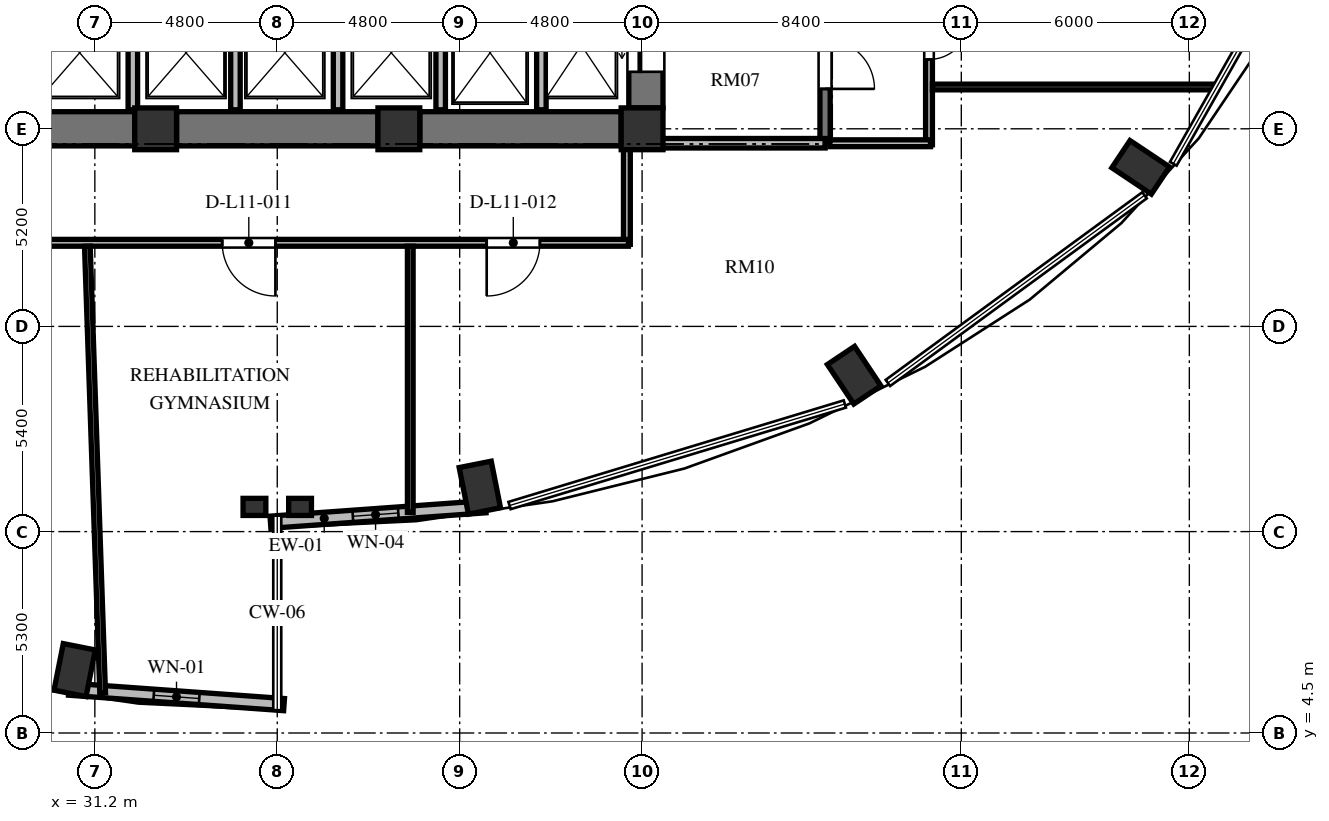
"""IFC4 building model, lengths in metres.
Left out: names, types, materials, properties, quantities, classifications, styles, units other than length and angle.
Written with IfcOpenShell. Run it as: python <this file> out.ifc"""

import sys

from ifc_helpers import new_model, si_unit, direction, frame, frame_2d, origin, origin_2d, place, context, subcontext, project, spatial, rectangle, extrude, element, fill, save


model = new_model("IFC4")
c1 = context("Model", 3, precision=1e-05, world=origin(), true_north=direction((0.0, 1.0)))
c2 = subcontext(c1, "Body", "Model", "MODEL_VIEW")
j1 = project(units=[si_unit("LENGTHUNIT", "METRE"), si_unit("PLANEANGLEUNIT", "RADIAN")], contexts=[c1])
p1 = place(None, origin())
s1 = spatial("IfcSite", under=j1, at=p1, CompositionType="ELEMENT")
p2 = place(p1, origin())
s2 = spatial("IfcBuilding", under=s1, at=p2, CompositionType="ELEMENT")
p3 = place(p2, frame((0.0, 0.0, 47.088)))
s3 = spatial("IfcBuildingStorey", under=s2, at=p3, CompositionType="ELEMENT", Elevation=47.088)
for number, where, z_axis, x_axis in (
    (1, (41.331, 10.956, 0.0), (0.0, 0.0, 1.0), (0.195, -0.981, 0.0)),
    (2, (51.181, 13.916, 0.0), (0.0, 0.0, 1.0), (0.556, -0.831, 0.0)),
    (3, (58.72, 19.386, 0.0), (0.0, 0.0, 1.0), (0.831, -0.556, 0.0)),
    (4, (30.669, 6.156, 0.0), (0.0, 0.0, 1.0), (-0.195, -0.981, 0.0)),
):
    element("IfcColumn", number, at=place(p3, frame(where, z_axis=z_axis, x_axis=x_axis)), inside=s3, PredefinedType="COLUMN", context=c2, shape_type="SweptSolid", body=[
        extrude(rectangle(XDim=1.25, YDim=0.86, at=origin_2d()), origin(), (0.0, 0.0, 1.0), 3.648),
    ])
for number, where, z_axis, x_axis in (
    (5, (32.8, 20.4, 0.0), (0.0, 0.0, 1.0), (1.0, 0.0, 0.0)),
    (6, (39.2, 20.4, 0.0), (0.0, 0.0, 1.0), (1.0, 0.0, 0.0)),
    (7, (45.6, 20.4, 0.0), (0.0, 0.0, 1.0), (1.0, 0.0, 0.0)),
):
    element("IfcColumn", number, at=place(p3, frame(where, z_axis=z_axis, x_axis=x_axis)), inside=s3, PredefinedType="COLUMN", context=c2, shape_type="SweptSolid", body=[
        extrude(rectangle(XDim=1.1, YDim=1.1, at=origin_2d()), origin(), (0.0, 0.0, 1.0), 3.648),
    ])
for number, where, z_axis, x_axis in (
    (8, (35.4, 10.45, 0.0), (0.0, 0.0, 1.0), (1.0, 0.0, 0.0)),
    (9, (36.6, 10.45, 0.0), (0.0, 0.0, 1.0), (1.0, 0.0, 0.0)),
):
    element("IfcColumn", number, at=place(p3, frame(where, z_axis=z_axis, x_axis=x_axis)), inside=s3, PredefinedType="PILASTER", context=c2, shape_type="SweptSolid", body=[
        extrude(rectangle(XDim=0.6, YDim=0.45, at=origin_2d()), origin(), (0.0, 0.0, 1.0), 3.648),
    ])
p4 = place(p3, frame((45.7, 20.95, 0.0), z_axis=(0.0, 0.0, 1.0), x_axis=(0.0, 1.0, 0.0)))
e10 = element("IfcWall", 10, at=p4, inside=s3, PredefinedType="SHEAR", context=c2, shape_type="SweptSolid", body=[
    extrude(rectangle(XDim=14.1, YDim=0.9, at=frame_2d((7.05, 0.0))), origin(), (0.0, 0.0, 1.0), 3.648),
])
p5 = place(p4, frame((11.75, 0.0, 0.0)))
e11 = element("IfcOpeningElement", 11, at=p5, cuts=e10, PredefinedType="OPENING", context=c2, shape_type="SweptSolid", body=[
    extrude(rectangle(XDim=1.4, YDim=2.3, at=frame_2d((0.7, 1.15))), frame((0.0, 0.46, 0.0), z_axis=(0.0, -1.0, 0.0), x_axis=(1.0, 0.0, 0.0)), (0.0, 0.0, 1.0), 0.92),
])
p6 = place(p4, frame((0.95, 0.0, 0.0)))
e12 = element("IfcOpeningElement", 12, at=p6, cuts=e10, PredefinedType="OPENING", context=c2, shape_type="SweptSolid", body=[
    extrude(rectangle(XDim=1.4, YDim=2.3, at=frame_2d((0.7, 1.15))), frame((0.0, 0.46, 0.0), z_axis=(0.0, -1.0, 0.0), x_axis=(1.0, 0.0, 0.0)), (0.0, 0.0, 1.0), 0.92),
])
p7 = place(p3, frame((26.95, 20.4, 0.0), z_axis=(0.0, 0.0, 1.0), x_axis=(1.0, 0.0, 0.0)))
e13 = element("IfcWall", 13, at=p7, inside=s3, PredefinedType="SHEAR", context=c2, shape_type="SweptSolid", body=[
    extrude(rectangle(XDim=5.3, YDim=0.9, at=frame_2d((2.65, 0.0))), origin(), (0.0, 0.0, 1.0), 3.648),
])
p8 = place(p3, frame((33.35, 20.4, 0.0), z_axis=(0.0, 0.0, 1.0), x_axis=(1.0, 0.0, 0.0)))
e14 = element("IfcWall", 14, at=p8, inside=s3, PredefinedType="SHEAR", context=c2, shape_type="SweptSolid", body=[
    extrude(rectangle(XDim=5.3, YDim=0.9, at=frame_2d((2.65, 0.0))), origin(), (0.0, 0.0, 1.0), 3.648),
])
p9 = place(p3, frame((39.75, 20.4, 0.0), z_axis=(0.0, 0.0, 1.0), x_axis=(1.0, 0.0, 0.0)))
e15 = element("IfcWall", 15, at=p9, inside=s3, PredefinedType="SHEAR", context=c2, shape_type="SweptSolid", body=[
    extrude(rectangle(XDim=5.3, YDim=0.9, at=frame_2d((2.65, 0.0))), origin(), (0.0, 0.0, 1.0), 3.648),
])
p10 = place(p3, frame((35.821, 10.047, 0.0), z_axis=(0.0, 0.0, 1.0), x_axis=(0.997422321809, 0.071754525696, 0.0)))
e16 = element("IfcWall", 16, at=p10, inside=s3, PredefinedType="SOLIDWALL", context=c2, shape_type="SweptSolid", body=[
    extrude(rectangle(XDim=5.675, YDim=0.32, at=frame_2d((2.838, 0.0))), origin(), (0.0, 0.0, 1.0), 3.428),
])
p11 = place(p10, frame((2.174, 0.0, 0.85)))
e17 = element("IfcOpeningElement", 17, at=p11, cuts=e16, PredefinedType="OPENING", context=c2, shape_type="SweptSolid", body=[
    extrude(rectangle(XDim=1.2, YDim=1.8, at=frame_2d((0.6, 0.9))), frame((0.0, 0.17, 0.0), z_axis=(0.0, -1.0, 0.0), x_axis=(1.0, 0.0, 0.0)), (0.0, 0.0, 1.0), 0.34),
])
p12 = place(p3, frame((30.519, 5.654, 0.0), z_axis=(0.0, 0.0, 1.0), x_axis=(0.997421878774, -0.071760683825, 0.0)))
e18 = element("IfcWall", 18, at=p12, inside=s3, PredefinedType="SOLIDWALL", context=c2, shape_type="SweptSolid", body=[
    extrude(rectangle(XDim=5.675, YDim=0.32, at=frame_2d((2.837, 0.0))), origin(), (0.0, 0.0, 1.0), 3.428),
])
p13 = place(p12, frame((2.237, 0.0, 0.85)))
e19 = element("IfcOpeningElement", 19, at=p13, cuts=e18, PredefinedType="OPENING", context=c2, shape_type="SweptSolid", body=[
    extrude(rectangle(XDim=1.2, YDim=2.2, at=frame_2d((0.6, 1.1))), frame((0.0, 0.17, 0.0), z_axis=(0.0, -1.0, 0.0), x_axis=(1.0, 0.0, 0.0)), (0.0, 0.0, 1.0), 0.34),
])
p14 = place(p3, frame((42.95, 20.9, 0.0), z_axis=(0.0, 0.0, 1.0), x_axis=(0.0, 1.0, 0.0)))
e20 = element("IfcWall", 20, at=p14, inside=s3, PredefinedType="SOLIDWALL", context=c2, shape_type="SweptSolid", body=[
    extrude(rectangle(XDim=3.2, YDim=0.25, at=frame_2d((1.6, 0.0))), origin(), (0.0, 0.0, 1.0), 3.428),
])
for number, where, z_axis, x_axis in (
    (21, (32.2, 20.9, 0.0), (0.0, 0.0, 1.0), (0.0, 1.0, 0.0)),
    (22, (34.9, 20.9, 0.0), (0.0, 0.0, 1.0), (0.0, 1.0, 0.0)),
    (23, (37.6, 20.9, 0.0), (0.0, 0.0, 1.0), (0.0, 1.0, 0.0)),
    (24, (40.3, 20.9, 0.0), (0.0, 0.0, 1.0), (0.0, 1.0, 0.0)),
):
    element("IfcWall", number, at=place(p3, frame(where, z_axis=z_axis, x_axis=x_axis)), inside=s3, PredefinedType="SOLIDWALL", context=c2, shape_type="SweptSolid", body=[
        extrude(rectangle(XDim=2.8, YDim=0.25, at=frame_2d((1.4, 0.0))), origin(), (0.0, 0.0, 1.0), 3.428),
    ])
p15 = place(p3, frame((50.415, 35.845, 0.0), z_axis=(0.0, 0.0, 1.0), x_axis=(0.0, -1.0, 0.0)))
e25 = element("IfcWall", 25, at=p15, inside=s3, PredefinedType="SHEAR", context=c2, shape_type="SweptSolid", body=[
    extrude(rectangle(XDim=15.825, YDim=0.27, at=frame_2d((7.913, 0.0))), origin(), (0.0, 0.0, 1.0), 3.648),
])
p16 = place(p15, frame((4.445, 0.0, 0.0)))
e26 = element("IfcOpeningElement", 26, at=p16, cuts=e25, PredefinedType="OPENING", context=c2, shape_type="SweptSolid", body=[
    extrude(rectangle(XDim=1.2, YDim=2.15, at=frame_2d((0.6, 1.075))), frame((0.0, 0.145, 0.0), z_axis=(0.0, -1.0, 0.0), x_axis=(1.0, 0.0, 0.0)), (0.0, 0.0, 1.0), 0.29),
])
p17 = place(p15, frame((1.295, 0.0, 0.0)))
e27 = element("IfcOpeningElement", 27, at=p17, cuts=e25, PredefinedType="OPENING", context=c2, shape_type="SweptSolid", body=[
    extrude(rectangle(XDim=1.3, YDim=2.2, at=frame_2d((0.65, 1.1))), frame((0.0, 0.145, 0.0), z_axis=(0.0, -1.0, 0.0), x_axis=(1.0, 0.0, 0.0)), (0.0, 0.0, 1.0), 0.29),
])
p18 = place(p15, frame((13.095, 0.0, 0.0)))
e28 = element("IfcOpeningElement", 28, at=p18, cuts=e25, PredefinedType="OPENING", context=c2, shape_type="SweptSolid", body=[
    extrude(rectangle(XDim=1.3, YDim=2.2, at=frame_2d((0.65, 1.1))), frame((0.0, 0.145, 0.0), z_axis=(0.0, -1.0, 0.0), x_axis=(1.0, 0.0, 0.0)), (0.0, 0.0, 1.0), 0.29),
])
p19 = place(p3, frame((45.7, 20.02, 0.0), z_axis=(0.0, 0.0, 1.0), x_axis=(1.0, 0.0, 0.0)))
e29 = element("IfcWall", 29, at=p19, inside=s3, PredefinedType="SOLIDWALL", context=c2, shape_type="SweptSolid", body=[
    extrude(rectangle(XDim=4.715, YDim=0.25, at=frame_2d((2.357, 0.0))), origin(), (0.0, 0.0, 1.0), 2.813),
])
p20 = place(p3, frame((53.15, 26.64, 0.0), z_axis=(0.0, 0.0, 1.0), x_axis=(0.0, -1.0, 0.0)))
e30 = element("IfcWall", 30, at=p20, inside=s3, PredefinedType="PARTITIONING", context=c2, shape_type="SweptSolid", body=[
    extrude(rectangle(XDim=6.66, YDim=0.18, at=frame_2d((3.33, 0.0))), origin(), (0.0, 0.0, 1.0), 3.428),
])
p21 = place(p20, frame((3.365, 0.0, 0.0)))
e31 = element("IfcOpeningElement", 31, at=p21, cuts=e30, PredefinedType="OPENING", context=c2, shape_type="SweptSolid", body=[
    extrude(rectangle(XDim=1.05, YDim=2.15, at=frame_2d((0.525, 1.075))), frame((0.0, 0.1, 0.0), z_axis=(0.0, -1.0, 0.0), x_axis=(1.0, 0.0, 0.0)), (0.0, 0.0, 1.0), 0.2),
])
p22 = place(p3, frame((53.19, 20.02, 0.0), z_axis=(0.0, 0.0, 1.0), x_axis=(-1.0, 0.0, 0.0)))
e32 = element("IfcWall", 32, at=p22, inside=s3, PredefinedType="PARTITIONING", context=c2, shape_type="SweptSolid", body=[
    extrude(rectangle(XDim=2.65, YDim=0.18, at=frame_2d((1.325, 0.0))), origin(), (0.0, 0.0, 1.0), 2.813),
])
p23 = place(p3, frame((45.2, 19.91, 0.0), z_axis=(0.0, 0.0, 1.0), x_axis=(0.0, -1.0, 0.0)))
e33 = element("IfcWall", 33, at=p23, inside=s3, PredefinedType="PARTITIONING", context=c2, shape_type="SweptSolid", body=[
    extrude(rectangle(XDim=2.55, YDim=0.18, at=frame_2d((1.275, 0.0))), origin(), (0.0, 0.0, 1.0), 3.428),
])
p24 = place(p3, frame((45.24, 17.4, 0.0), z_axis=(0.0, 0.0, 1.0), x_axis=(-1.0, 0.0, 0.0)))
e34 = element("IfcWall", 34, at=p24, inside=s3, PredefinedType="PARTITIONING", context=c2, shape_type="SweptSolid", body=[
    extrude(rectangle(XDim=21.93, YDim=0.18, at=frame_2d((10.965, 0.0))), origin(), (0.0, 0.0, 1.0), 3.053),
])
p25 = place(p24, frame((9.289, 0.0, 0.0)))
e35 = element("IfcOpeningElement", 35, at=p25, cuts=e34, PredefinedType="OPENING", context=c2, shape_type="SweptSolid", body=[
    extrude(rectangle(XDim=1.4, YDim=2.2, at=frame_2d((0.7, 1.1))), frame((0.0, 0.1, 0.0), z_axis=(0.0, -1.0, 0.0), x_axis=(1.0, 0.0, 0.0)), (0.0, 0.0, 1.0), 0.2),
])
p26 = place(p24, frame((2.329, 0.0, 0.0)))
e36 = element("IfcOpeningElement", 36, at=p26, cuts=e34, PredefinedType="OPENING", context=c2, shape_type="SweptSolid", body=[
    extrude(rectangle(XDim=1.4, YDim=2.2, at=frame_2d((0.7, 1.1))), frame((0.0, 0.1, 0.0), z_axis=(0.0, -1.0, 0.0), x_axis=(1.0, 0.0, 0.0)), (0.0, 0.0, 1.0), 0.2),
])
p27 = place(p3, frame((53.24, 21.5, 0.0), z_axis=(0.0, 0.0, 1.0), x_axis=(1.0, 0.0, 0.0)))
e37 = element("IfcWall", 37, at=p27, inside=s3, PredefinedType="PARTITIONING", context=c2, shape_type="SweptSolid", body=[
    extrude(rectangle(XDim=7.479, YDim=0.15, at=frame_2d((3.74, 0.0))), origin(), (0.0, 0.0, 1.0), 3.428),
])
p28 = place(p3, frame((31.405, 5.559, 0.0), z_axis=(0.0, 0.0, 1.0), x_axis=(-0.034219123574, 0.9994143543, 0.0)))
e38 = element("IfcWall", 38, at=p28, inside=s3, PredefinedType="PARTITIONING", context=c2, shape_type="SweptSolid", body=[
    extrude(rectangle(XDim=11.758, YDim=0.15, at=frame_2d((5.879, 0.0))), origin(), (0.0, 0.0, 1.0), 2.813),
])
p29 = place(p3, frame((39.5, 10.308, 0.0), z_axis=(0.0, 0.0, 1.0), x_axis=(0.0, 1.0, 0.0)))
e39 = element("IfcWall", 39, at=p29, inside=s3, PredefinedType="PARTITIONING", context=c2, shape_type="SweptSolid", body=[
    extrude(rectangle(XDim=7.002, YDim=0.15, at=frame_2d((3.501, 0.0))), origin(), (0.0, 0.0, 1.0), 3.428),
])
p30 = place(p11, origin())
e40 = element("IfcWindow", 40, at=p30, inside=s3, PartitioningType="SINGLE_PANEL", PredefinedType="WINDOW", context=c2, shape_type="SweptSolid", body=[
    extrude(rectangle(XDim=1.2, YDim=1.8, at=frame_2d((0.6, 0.9))), frame((0.0, 0.03, 0.0), z_axis=(0.0, -1.0, 0.0), x_axis=(1.0, 0.0, 0.0)), (0.0, 0.0, 1.0), 0.06),
])
fill(e17, e40)
p31 = place(p13, origin())
e41 = element("IfcWindow", 41, at=p31, inside=s3, PartitioningType="SINGLE_PANEL", PredefinedType="WINDOW", context=c2, shape_type="SweptSolid", body=[
    extrude(rectangle(XDim=1.2, YDim=2.2, at=frame_2d((0.6, 1.1))), frame((0.0, 0.03, 0.0), z_axis=(0.0, -1.0, 0.0), x_axis=(1.0, 0.0, 0.0)), (0.0, 0.0, 1.0), 0.06),
])
fill(e19, e41)
p32 = place(p6, origin())
e42 = element("IfcDoor", 42, at=p32, inside=s3, OperationType="SLIDING_TO_LEFT", PredefinedType="DOOR", context=c2, shape_type="SweptSolid", body=[
    extrude(rectangle(XDim=1.4, YDim=2.3, at=frame_2d((0.7, 1.15))), frame((0.0, 0.025, 0.0), z_axis=(0.0, -1.0, 0.0), x_axis=(1.0, 0.0, 0.0)), (0.0, 0.0, 1.0), 0.05),
])
fill(e12, e42)
p33 = place(p18, origin())
e43 = element("IfcDoor", 43, at=p33, inside=s3, OperationType="SINGLE_SWING_RIGHT", PredefinedType="DOOR", context=c2, shape_type="SweptSolid", body=[
    extrude(rectangle(XDim=1.3, YDim=2.2, at=frame_2d((0.65, 1.1))), frame((0.0, 0.025, 0.0), z_axis=(0.0, -1.0, 0.0), x_axis=(1.0, 0.0, 0.0)), (0.0, 0.0, 1.0), 0.05),
])
fill(e28, e43)
p34 = place(p25, origin())
e44 = element("IfcDoor", 44, at=p34, inside=s3, OperationType="SINGLE_SWING_LEFT", PredefinedType="DOOR", context=c2, shape_type="SweptSolid", body=[
    extrude(rectangle(XDim=1.4, YDim=2.2, at=frame_2d((0.7, 1.1))), frame((0.0, 0.025, 0.0), z_axis=(0.0, -1.0, 0.0), x_axis=(1.0, 0.0, 0.0)), (0.0, 0.0, 1.0), 0.05),
])
fill(e35, e44)
p35 = place(p26, origin())
e45 = element("IfcDoor", 45, at=p35, inside=s3, OperationType="SINGLE_SWING_RIGHT", PredefinedType="DOOR", context=c2, shape_type="SweptSolid", body=[
    extrude(rectangle(XDim=1.4, YDim=2.2, at=frame_2d((0.7, 1.1))), frame((0.0, 0.025, 0.0), z_axis=(0.0, -1.0, 0.0), x_axis=(1.0, 0.0, 0.0)), (0.0, 0.0, 1.0), 0.05),
])
fill(e36, e45)
p36 = place(p21, origin())
e46 = element("IfcDoor", 46, at=p36, inside=s3, OperationType="SINGLE_SWING_LEFT", PredefinedType="DOOR", context=c2, shape_type="SweptSolid", body=[
    extrude(rectangle(XDim=1.05, YDim=2.15, at=frame_2d((0.525, 1.075))), frame((0.0, 0.025, 0.0), z_axis=(0.0, -1.0, 0.0), x_axis=(1.0, 0.0, 0.0)), (0.0, 0.0, 1.0), 0.05),
])
fill(e31, e46)
save(model, sys.argv[1])
